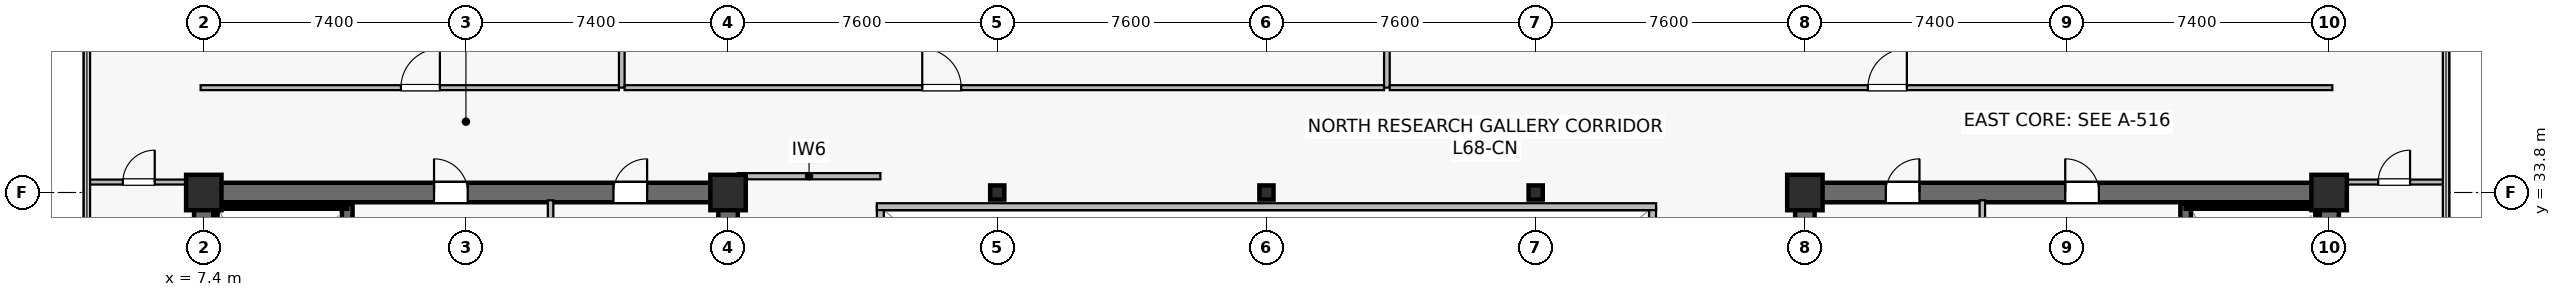
"""IFC4 building model, lengths in metres.
Left out: names, types, materials, properties, quantities, classifications, styles, units other than length and angle.
Written with IfcOpenShell. Run it as: python <this file> out.ifc"""

import sys

from ifc_helpers import new_model, si_unit, direction, frame, frame_2d, origin, origin_2d, place, context, subcontext, project, spatial, rectangle, hollow_rectangle, extrude, source, transform, mapped, element, fill, save


model = new_model("IFC4")
c1 = context("Model", 3, precision=1e-05, world=origin(), true_north=direction((0.0, 1.0)))
c2 = subcontext(c1, "Body", "Model", "MODEL_VIEW")
j1 = project(units=[si_unit("LENGTHUNIT", "METRE"), si_unit("PLANEANGLEUNIT", "RADIAN")], contexts=[c1])
p1 = place(None, origin())
s1 = spatial("IfcSite", under=j1, at=p1, CompositionType="ELEMENT")
p2 = place(p1, origin())
s2 = spatial("IfcBuilding", under=s1, at=p2, CompositionType="ELEMENT")
p3 = place(p2, frame((0.0, 0.0, 283.4)))
s3 = spatial("IfcBuildingStorey", under=s2, at=p3, CompositionType="ELEMENT", Elevation=283.4)
p4 = place(p3, frame((7.125, 33.8, 0.0), z_axis=(0.0, 0.0, 1.0), x_axis=(1.0, 0.0, 0.0)))
e1 = element("IfcWall", 1, at=p4, inside=s3, PredefinedType="SHEAR", context=c2, shape_type="SweptSolid", body=[
    extrude(rectangle(XDim=15.35, YDim=0.55, at=frame_2d((7.675, 0.0))), origin(), (0.0, 0.0, 1.0), 3.8),
])
p5 = place(p4, frame((6.775, 0.0, 0.0)))
e2 = element("IfcOpeningElement", 2, at=p5, cuts=e1, PredefinedType="OPENING", context=c2, shape_type="SweptSolid", body=[
    extrude(rectangle(XDim=0.95, YDim=2.15, at=frame_2d((0.475, 1.075))), frame((0.0, 0.285, 0.0), z_axis=(0.0, -1.0, 0.0), x_axis=(1.0, 0.0, 0.0)), (0.0, 0.0, 1.0), 0.57),
])
p6 = place(p4, frame((11.84, 0.0, 0.0)))
e3 = element("IfcOpeningElement", 3, at=p6, cuts=e1, PredefinedType="OPENING", context=c2, shape_type="SweptSolid", body=[
    extrude(rectangle(XDim=0.95, YDim=2.15, at=frame_2d((0.475, 1.075))), frame((0.0, 0.285, 0.0), z_axis=(0.0, -1.0, 0.0), x_axis=(1.0, 0.0, 0.0)), (0.0, 0.0, 1.0), 0.57),
])
p7 = place(p3, frame((7.4, 15.075, 0.0), z_axis=(0.0, 0.0, 1.0), x_axis=(0.0, 1.0, 0.0)))
e4 = element("IfcWall", 4, at=p7, inside=s3, PredefinedType="SHEAR", context=c2, shape_type="SweptSolid", body=[
    extrude(rectangle(XDim=18.45, YDim=0.55, at=frame_2d((9.225, 0.0))), origin(), (0.0, 0.0, 1.0), 3.8),
])
p8 = place(p3, frame((22.2, 15.075, 0.0), z_axis=(0.0, 0.0, 1.0), x_axis=(0.0, 1.0, 0.0)))
e5 = element("IfcWall", 5, at=p8, inside=s3, PredefinedType="SHEAR", context=c2, shape_type="SweptSolid", body=[
    extrude(rectangle(XDim=18.45, YDim=0.55, at=frame_2d((9.225, 0.0))), origin(), (0.0, 0.0, 1.0), 3.8),
])
p9 = place(p8, frame((3.475, 0.0, 0.0)))
e6 = element("IfcOpeningElement", 6, at=p9, cuts=e5, PredefinedType="OPENING", context=c2, shape_type="SweptSolid", body=[
    extrude(rectangle(XDim=1.42, YDim=2.2, at=frame_2d((0.71, 1.1))), frame((0.0, 0.285, 0.0), z_axis=(0.0, -1.0, 0.0), x_axis=(1.0, 0.0, 0.0)), (0.0, 0.0, 1.0), 0.57),
])
p10 = place(p3, frame((11.45, 24.85, 0.0), z_axis=(0.0, 0.0, 1.0), x_axis=(0.0, 1.0, 0.0)))
e7 = element("IfcWall", 7, at=p10, inside=s3, PredefinedType="SHEAR", context=c2, shape_type="SweptSolid", body=[
    extrude(rectangle(XDim=8.63, YDim=0.3, at=frame_2d((4.315, 0.0))), origin(), (0.0, 0.0, 1.0), 3.8),
])
p11 = place(p10, frame((0.42, 0.0, 0.0)))
e8 = element("IfcOpeningElement", 8, at=p11, cuts=e7, PredefinedType="OPENING", context=c2, shape_type="SweptSolid", body=[
    extrude(rectangle(XDim=1.1, YDim=2.15, at=frame_2d((0.55, 1.075))), frame((0.0, 0.16, 0.0), z_axis=(0.0, -1.0, 0.0), x_axis=(1.0, 0.0, 0.0)), (0.0, 0.0, 1.0), 0.32),
])
p12 = place(p3, frame((7.73, 33.4, 0.0), z_axis=(0.0, 0.0, 1.0), x_axis=(1.0, 0.0, 0.0)))
e9 = element("IfcWall", 9, at=p12, inside=s3, PredefinedType="SOLIDWALL", context=c2, shape_type="SweptSolid", body=[
    extrude(rectangle(XDim=3.72, YDim=0.12, at=frame_2d((1.86, 0.0))), origin(), (0.0, 0.0, 1.0), 3.8),
])
p13 = place(p3, frame((7.73, 25.0, 0.0), z_axis=(0.0, 0.0, 1.0), x_axis=(0.0, 1.0, 0.0)))
e10 = element("IfcWall", 10, at=p13, inside=s3, PredefinedType="SOLIDWALL", context=c2, shape_type="SweptSolid", body=[
    extrude(rectangle(XDim=8.32, YDim=0.12, at=frame_2d((4.16, 0.0))), origin(), (0.0, 0.0, 1.0), 3.8),
])
p14 = place(p3, frame((52.325, 33.8, 0.0), z_axis=(0.0, 0.0, 1.0), x_axis=(1.0, 0.0, 0.0)))
e11 = element("IfcWall", 11, at=p14, inside=s3, PredefinedType="SHEAR", context=c2, shape_type="SweptSolid", body=[
    extrude(rectangle(XDim=15.35, YDim=0.55, at=frame_2d((7.675, 0.0))), origin(), (0.0, 0.0, 1.0), 3.8),
])
p15 = place(p14, frame((7.625, 0.0, 0.0)))
e12 = element("IfcOpeningElement", 12, at=p15, cuts=e11, PredefinedType="OPENING", context=c2, shape_type="SweptSolid", body=[
    extrude(rectangle(XDim=0.95, YDim=2.15, at=frame_2d((0.475, 1.075))), frame((0.0, 0.285, 0.0), z_axis=(0.0, -1.0, 0.0), x_axis=(1.0, 0.0, 0.0)), (0.0, 0.0, 1.0), 0.57),
])
p16 = place(p14, frame((2.56, 0.0, 0.0)))
e13 = element("IfcOpeningElement", 13, at=p16, cuts=e11, PredefinedType="OPENING", context=c2, shape_type="SweptSolid", body=[
    extrude(rectangle(XDim=0.95, YDim=2.15, at=frame_2d((0.475, 1.075))), frame((0.0, 0.285, 0.0), z_axis=(0.0, -1.0, 0.0), x_axis=(1.0, 0.0, 0.0)), (0.0, 0.0, 1.0), 0.57),
])
p17 = place(p3, frame((52.6, 15.075, 0.0), z_axis=(0.0, 0.0, 1.0), x_axis=(0.0, 1.0, 0.0)))
e14 = element("IfcWall", 14, at=p17, inside=s3, PredefinedType="SHEAR", context=c2, shape_type="SweptSolid", body=[
    extrude(rectangle(XDim=18.45, YDim=0.55, at=frame_2d((9.225, 0.0))), origin(), (0.0, 0.0, 1.0), 3.8),
])
p18 = place(p17, frame((3.475, 0.0, 0.0)))
e15 = element("IfcOpeningElement", 15, at=p18, cuts=e14, PredefinedType="OPENING", context=c2, shape_type="SweptSolid", body=[
    extrude(rectangle(XDim=1.42, YDim=2.2, at=frame_2d((0.71, 1.1))), frame((0.0, 0.285, 0.0), z_axis=(0.0, -1.0, 0.0), x_axis=(1.0, 0.0, 0.0)), (0.0, 0.0, 1.0), 0.57),
])
p19 = place(p3, frame((67.4, 15.075, 0.0), z_axis=(0.0, 0.0, 1.0), x_axis=(0.0, 1.0, 0.0)))
e16 = element("IfcWall", 16, at=p19, inside=s3, PredefinedType="SHEAR", context=c2, shape_type="SweptSolid", body=[
    extrude(rectangle(XDim=18.45, YDim=0.55, at=frame_2d((9.225, 0.0))), origin(), (0.0, 0.0, 1.0), 3.8),
])
p20 = place(p3, frame((63.35, 24.85, 0.0), z_axis=(0.0, 0.0, 1.0), x_axis=(0.0, 1.0, 0.0)))
e17 = element("IfcWall", 17, at=p20, inside=s3, PredefinedType="SHEAR", context=c2, shape_type="SweptSolid", body=[
    extrude(rectangle(XDim=8.63, YDim=0.3, at=frame_2d((4.315, 0.0))), origin(), (0.0, 0.0, 1.0), 3.8),
])
p21 = place(p20, frame((0.42, 0.0, 0.0)))
e18 = element("IfcOpeningElement", 18, at=p21, cuts=e17, PredefinedType="OPENING", context=c2, shape_type="SweptSolid", body=[
    extrude(rectangle(XDim=1.1, YDim=2.15, at=frame_2d((0.55, 1.075))), frame((0.0, 0.16, 0.0), z_axis=(0.0, -1.0, 0.0), x_axis=(1.0, 0.0, 0.0)), (0.0, 0.0, 1.0), 0.32),
])
p22 = place(p3, frame((63.35, 33.4, 0.0), z_axis=(0.0, 0.0, 1.0), x_axis=(1.0, 0.0, 0.0)))
e19 = element("IfcWall", 19, at=p22, inside=s3, PredefinedType="SOLIDWALL", context=c2, shape_type="SweptSolid", body=[
    extrude(rectangle(XDim=3.72, YDim=0.12, at=frame_2d((1.86, 0.0))), origin(), (0.0, 0.0, 1.0), 3.8),
])
p23 = place(p3, frame((67.07, 25.0, 0.0), z_axis=(0.0, 0.0, 1.0), x_axis=(0.0, 1.0, 0.0)))
e20 = element("IfcWall", 20, at=p23, inside=s3, PredefinedType="SOLIDWALL", context=c2, shape_type="SweptSolid", body=[
    extrude(rectangle(XDim=8.32, YDim=0.12, at=frame_2d((4.16, 0.0))), origin(), (0.0, 0.0, 1.0), 3.8),
])
m1 = source(origin(), c2, "Body", "SweptSolid", [
    extrude(rectangle(XDim=1.0, YDim=1.0, at=origin_2d()), origin(), (0.0, 0.0, 1.0), 4.1),
])
for number, where, z_axis, x_axis in (
    (21, (7.4, 33.8, 0.0), (0.0, 0.0, 1.0), (1.0, 0.0, 0.0)),
    (22, (22.2, 33.8, 0.0), (0.0, 0.0, 1.0), (1.0, 0.0, 0.0)),
    (23, (52.6, 33.8, 0.0), (0.0, 0.0, 1.0), (1.0, 0.0, 0.0)),
    (24, (67.4, 33.8, 0.0), (0.0, 0.0, 1.0), (1.0, 0.0, 0.0)),
):
    element("IfcColumn", number, at=place(p3, frame(where, z_axis=z_axis, x_axis=x_axis)), inside=s3, PredefinedType="COLUMN", context=c2, shape_type="MappedRepresentation", body=[
        mapped(m1, transform((0.0, 0.0, 0.0), scale=1.0)),
    ])
m2 = source(origin(), c2, "Body", "SweptSolid", [
    extrude(hollow_rectangle(XDim=0.4, YDim=0.4, WallThickness=0.019, at=origin_2d()), origin(), (0.0, 0.0, 1.0), 4.1),
])
for number, where, z_axis, x_axis in (
    (25, (29.8, 33.8, 0.0), (0.0, 0.0, 1.0), (1.0, 0.0, 0.0)),
    (26, (37.4, 33.8, 0.0), (0.0, 0.0, 1.0), (1.0, 0.0, 0.0)),
    (27, (45.0, 33.8, 0.0), (0.0, 0.0, 1.0), (1.0, 0.0, 0.0)),
):
    element("IfcColumn", number, at=place(p3, frame(where, z_axis=z_axis, x_axis=x_axis)), inside=s3, PredefinedType="COLUMN", context=c2, shape_type="MappedRepresentation", body=[
        mapped(m2, transform((0.0, 0.0, 0.0), scale=1.0)),
    ])
for number, where, z_axis, x_axis in (
    (28, (17.19, 29.65, 0.0), (0.0, 0.0, 1.0), (0.0, 1.0, 0.0)),
    (29, (57.61, 29.65, 0.0), (0.0, 0.0, 1.0), (0.0, 1.0, 0.0)),
):
    element("IfcWall", number, at=place(p3, frame(where, z_axis=z_axis, x_axis=x_axis)), inside=s3, PredefinedType="PLUMBINGWALL", context=c2, shape_type="SweptSolid", body=[
        extrude(rectangle(XDim=3.93, YDim=0.155, at=frame_2d((1.965, 0.0))), origin(), (0.0, 0.0, 1.0), 3.8),
    ])
p24 = place(p3, frame((22.475, 34.26, 0.0), z_axis=(0.0, 0.0, 1.0), x_axis=(1.0, 0.0, 0.0)))
e30 = element("IfcWall", 30, at=p24, inside=s3, PredefinedType="PARTITIONING", context=c2, shape_type="SweptSolid", body=[
    extrude(rectangle(XDim=4.025, YDim=0.175, at=frame_2d((2.012, 0.0))), origin(), (0.0, 0.0, 1.0), 3.535),
])
p25 = place(p3, frame((26.5, 15.2, 0.0), z_axis=(0.0, 0.0, 1.0), x_axis=(0.0, 1.0, 0.0)))
e31 = element("IfcWall", 31, at=p25, inside=s3, PredefinedType="SOLIDWALL", context=c2, shape_type="SweptSolid", body=[
    extrude(rectangle(XDim=18.2, YDim=0.195, at=frame_2d((9.1, 0.0))), origin(), (0.0, 0.0, 1.0), 3.8),
])
p26 = place(p25, frame((1.8, 0.0, 0.9)))
e32 = element("IfcOpeningElement", 32, at=p26, cuts=e31, PredefinedType="OPENING", context=c2, shape_type="SweptSolid", body=[
    extrude(rectangle(XDim=1.5, YDim=1.4, at=frame_2d((0.75, 0.7))), frame((0.0, 0.107, 0.0), z_axis=(0.0, -1.0, 0.0), x_axis=(1.0, 0.0, 0.0)), (0.0, 0.0, 1.0), 0.215),
])
p27 = place(p25, frame((13.2, 0.0, 0.9)))
e33 = element("IfcOpeningElement", 33, at=p27, cuts=e31, PredefinedType="OPENING", context=c2, shape_type="SweptSolid", body=[
    extrude(rectangle(XDim=1.5, YDim=1.4, at=frame_2d((0.75, 0.7))), frame((0.0, 0.107, 0.0), z_axis=(0.0, -1.0, 0.0), x_axis=(1.0, 0.0, 0.0)), (0.0, 0.0, 1.0), 0.215),
])
p28 = place(p3, frame((48.3, 15.2, 0.0), z_axis=(0.0, 0.0, 1.0), x_axis=(0.0, 1.0, 0.0)))
e34 = element("IfcWall", 34, at=p28, inside=s3, PredefinedType="SOLIDWALL", context=c2, shape_type="SweptSolid", body=[
    extrude(rectangle(XDim=18.2, YDim=0.195, at=frame_2d((9.1, 0.0))), origin(), (0.0, 0.0, 1.0), 3.8),
])
p29 = place(p28, frame((1.8, 0.0, 0.9)))
e35 = element("IfcOpeningElement", 35, at=p29, cuts=e34, PredefinedType="OPENING", context=c2, shape_type="SweptSolid", body=[
    extrude(rectangle(XDim=1.5, YDim=1.4, at=frame_2d((0.75, 0.7))), frame((0.0, 0.107, 0.0), z_axis=(0.0, -1.0, 0.0), x_axis=(1.0, 0.0, 0.0)), (0.0, 0.0, 1.0), 0.215),
])
p30 = place(p28, frame((13.2, 0.0, 0.9)))
e36 = element("IfcOpeningElement", 36, at=p30, cuts=e34, PredefinedType="OPENING", context=c2, shape_type="SweptSolid", body=[
    extrude(rectangle(XDim=1.5, YDim=1.4, at=frame_2d((0.75, 0.7))), frame((0.0, 0.107, 0.0), z_axis=(0.0, -1.0, 0.0), x_axis=(1.0, 0.0, 0.0)), (0.0, 0.0, 1.0), 0.215),
])
p31 = place(p3, frame((26.4, 33.4, 0.0), z_axis=(0.0, 0.0, 1.0), x_axis=(1.0, 0.0, 0.0)))
e37 = element("IfcWall", 37, at=p31, inside=s3, PredefinedType="SOLIDWALL", context=c2, shape_type="SweptSolid", body=[
    extrude(rectangle(XDim=22.0, YDim=0.195, at=frame_2d((11.0, 0.0))), origin(), (0.0, 0.0, 1.0), 3.8),
])
p32 = place(p3, frame((7.31, 36.76, 0.0), z_axis=(0.0, 0.0, 1.0), x_axis=(1.0, 0.0, 0.0)))
e38 = element("IfcWall", 38, at=p32, inside=s3, PredefinedType="PARTITIONING", context=c2, shape_type="SweptSolid", body=[
    extrude(rectangle(XDim=11.81, YDim=0.14, at=frame_2d((5.905, 0.0))), origin(), (0.0, 0.0, 1.0), 3.197),
])
p33 = place(p32, frame((5.655, 0.0, 0.0)))
e39 = element("IfcOpeningElement", 39, at=p33, cuts=e38, PredefinedType="OPENING", context=c2, shape_type="SweptSolid", body=[
    extrude(rectangle(XDim=1.1, YDim=2.18, at=frame_2d((0.55, 1.09))), frame((0.0, 0.08, 0.0), z_axis=(0.0, -1.0, 0.0), x_axis=(1.0, 0.0, 0.0)), (0.0, 0.0, 1.0), 0.16),
])
p34 = place(p3, frame((19.2, 36.76, 0.0), z_axis=(0.0, 0.0, 1.0), x_axis=(0.0, 1.0, 0.0)))
e40 = element("IfcWall", 40, at=p34, inside=s3, PredefinedType="PARTITIONING", context=c2, shape_type="SweptSolid", body=[
    extrude(rectangle(XDim=9.13, YDim=0.16, at=frame_2d((4.565, 0.0))), origin(), (0.0, 0.0, 1.0), 3.135),
])
p35 = place(p3, frame((19.28, 36.76, 0.0), z_axis=(0.0, 0.0, 1.0), x_axis=(1.0, 0.0, 0.0)))
e41 = element("IfcWall", 41, at=p35, inside=s3, PredefinedType="PARTITIONING", context=c2, shape_type="SweptSolid", body=[
    extrude(rectangle(XDim=21.44, YDim=0.14, at=frame_2d((10.72, 0.0))), origin(), (0.0, 0.0, 1.0), 3.197),
])
p36 = place(p35, frame((8.402, 0.0, 0.0)))
e42 = element("IfcOpeningElement", 42, at=p36, cuts=e41, PredefinedType="OPENING", context=c2, shape_type="SweptSolid", body=[
    extrude(rectangle(XDim=1.1, YDim=2.18, at=frame_2d((0.55, 1.09))), frame((0.0, 0.08, 0.0), z_axis=(0.0, -1.0, 0.0), x_axis=(1.0, 0.0, 0.0)), (0.0, 0.0, 1.0), 0.16),
])
p37 = place(p3, frame((40.8, 36.76, 0.0), z_axis=(0.0, 0.0, 1.0), x_axis=(0.0, 1.0, 0.0)))
e43 = element("IfcWall", 43, at=p37, inside=s3, PredefinedType="PARTITIONING", context=c2, shape_type="SweptSolid", body=[
    extrude(rectangle(XDim=7.93, YDim=0.16, at=frame_2d((3.965, 0.0))), origin(), (0.0, 0.0, 1.0), 3.135),
])
p38 = place(p3, frame((40.88, 36.76, 0.0), z_axis=(0.0, 0.0, 1.0), x_axis=(1.0, 0.0, 0.0)))
e44 = element("IfcWall", 44, at=p38, inside=s3, PredefinedType="PARTITIONING", context=c2, shape_type="SweptSolid", body=[
    extrude(rectangle(XDim=26.61, YDim=0.14, at=frame_2d((13.305, 0.0))), origin(), (0.0, 0.0, 1.0), 3.197),
])
p39 = place(p38, frame((13.499, 0.0, 0.0)))
e45 = element("IfcOpeningElement", 45, at=p39, cuts=e44, PredefinedType="OPENING", context=c2, shape_type="SweptSolid", body=[
    extrude(rectangle(XDim=1.1, YDim=2.18, at=frame_2d((0.55, 1.09))), frame((0.0, 0.08, 0.0), z_axis=(0.0, -1.0, 0.0), x_axis=(1.0, 0.0, 0.0)), (0.0, 0.0, 1.0), 0.16),
])
p40 = place(p3, frame((4.11, 34.095, 0.0), z_axis=(0.0, 0.0, 1.0), x_axis=(1.0, 0.0, 0.0)))
e46 = element("IfcWall", 46, at=p40, inside=s3, PredefinedType="PARTITIONING", context=c2, shape_type="SweptSolid", body=[
    extrude(rectangle(XDim=2.91, YDim=0.14, at=frame_2d((1.455, 0.0))), origin(), (0.0, 0.0, 1.0), 3.8),
])
p41 = place(p40, frame((1.005, 0.0, 0.0)))
e47 = element("IfcOpeningElement", 47, at=p41, cuts=e46, PredefinedType="OPENING", context=c2, shape_type="SweptSolid", body=[
    extrude(rectangle(XDim=0.9, YDim=2.1, at=frame_2d((0.45, 1.05))), frame((0.0, 0.08, 0.0), z_axis=(0.0, -1.0, 0.0), x_axis=(1.0, 0.0, 0.0)), (0.0, 0.0, 1.0), 0.16),
])
p42 = place(p3, frame((67.78, 34.095, 0.0), z_axis=(0.0, 0.0, 1.0), x_axis=(1.0, 0.0, 0.0)))
e48 = element("IfcWall", 48, at=p42, inside=s3, PredefinedType="PARTITIONING", context=c2, shape_type="SweptSolid", body=[
    extrude(rectangle(XDim=2.91, YDim=0.14, at=frame_2d((1.455, 0.0))), origin(), (0.0, 0.0, 1.0), 3.8),
])
p43 = place(p42, frame((1.005, 0.0, 0.0)))
e49 = element("IfcOpeningElement", 49, at=p43, cuts=e48, PredefinedType="OPENING", context=c2, shape_type="SweptSolid", body=[
    extrude(rectangle(XDim=0.9, YDim=2.1, at=frame_2d((0.45, 1.05))), frame((0.0, 0.08, 0.0), z_axis=(0.0, -1.0, 0.0), x_axis=(1.0, 0.0, 0.0)), (0.0, 0.0, 1.0), 0.16),
])
m3 = source(origin(), c2, "Body", "SweptSolid", [
    extrude(rectangle(XDim=0.95, YDim=2.15, at=frame_2d((0.475, 1.075))), frame((0.0, 0.025, 0.0), z_axis=(0.0, -1.0, 0.0), x_axis=(1.0, 0.0, 0.0)), (0.0, 0.0, 1.0), 0.05),
])
p44 = place(p5, origin())
e50 = element("IfcDoor", 50, at=p44, inside=s3, OperationType="SINGLE_SWING_LEFT", PredefinedType="DOOR", context=c2, shape_type="MappedRepresentation", body=[
    mapped(m3, transform((0.0, 0.0, 0.0), scale=1.0)),
])
fill(e2, e50)
p45 = place(p6, origin())
e51 = element("IfcDoor", 51, at=p45, inside=s3, OperationType="SINGLE_SWING_RIGHT", PredefinedType="DOOR", context=c2, shape_type="MappedRepresentation", body=[
    mapped(m3, transform((0.0, 0.0, 0.0), scale=1.0)),
])
fill(e3, e51)
p46 = place(p15, origin())
e52 = element("IfcDoor", 52, at=p46, inside=s3, OperationType="SINGLE_SWING_LEFT", PredefinedType="DOOR", context=c2, shape_type="MappedRepresentation", body=[
    mapped(m3, transform((0.0, 0.0, 0.0), scale=1.0)),
])
fill(e12, e52)
p47 = place(p16, origin())
e53 = element("IfcDoor", 53, at=p47, inside=s3, OperationType="SINGLE_SWING_RIGHT", PredefinedType="DOOR", context=c2, shape_type="MappedRepresentation", body=[
    mapped(m3, transform((0.0, 0.0, 0.0), scale=1.0)),
])
fill(e13, e53)
m4 = source(origin(), c2, "Body", "SweptSolid", [
    extrude(rectangle(XDim=1.1, YDim=2.18, at=frame_2d((0.55, 1.09))), frame((0.0, 0.025, 0.0), z_axis=(0.0, -1.0, 0.0), x_axis=(1.0, 0.0, 0.0)), (0.0, 0.0, 1.0), 0.05),
])
p48 = place(p33, origin())
e54 = element("IfcDoor", 54, at=p48, inside=s3, OperationType="SINGLE_SWING_RIGHT", PredefinedType="DOOR", context=c2, shape_type="MappedRepresentation", body=[
    mapped(m4, transform((0.0, 0.0, 0.0), scale=1.0)),
])
fill(e39, e54)
p49 = place(p36, origin())
e55 = element("IfcDoor", 55, at=p49, inside=s3, OperationType="SINGLE_SWING_LEFT", PredefinedType="DOOR", context=c2, shape_type="MappedRepresentation", body=[
    mapped(m4, transform((0.0, 0.0, 0.0), scale=1.0)),
])
fill(e42, e55)
p50 = place(p39, origin())
e56 = element("IfcDoor", 56, at=p50, inside=s3, OperationType="SINGLE_SWING_RIGHT", PredefinedType="DOOR", context=c2, shape_type="MappedRepresentation", body=[
    mapped(m4, transform((0.0, 0.0, 0.0), scale=1.0)),
])
fill(e45, e56)
m5 = source(origin(), c2, "Body", "SweptSolid", [
    extrude(rectangle(XDim=0.9, YDim=2.1, at=frame_2d((0.45, 1.05))), frame((0.0, 0.025, 0.0), z_axis=(0.0, -1.0, 0.0), x_axis=(1.0, 0.0, 0.0)), (0.0, 0.0, 1.0), 0.05),
])
p51 = place(p41, origin())
e57 = element("IfcDoor", 57, at=p51, inside=s3, OperationType="SINGLE_SWING_RIGHT", PredefinedType="DOOR", context=c2, shape_type="MappedRepresentation", body=[
    mapped(m5, transform((0.0, 0.0, 0.0), scale=1.0)),
])
fill(e47, e57)
p52 = place(p43, origin())
e58 = element("IfcDoor", 58, at=p52, inside=s3, OperationType="SINGLE_SWING_RIGHT", PredefinedType="DOOR", context=c2, shape_type="MappedRepresentation", body=[
    mapped(m5, transform((0.0, 0.0, 0.0), scale=1.0)),
])
fill(e49, e58)
save(model, sys.argv[1])
